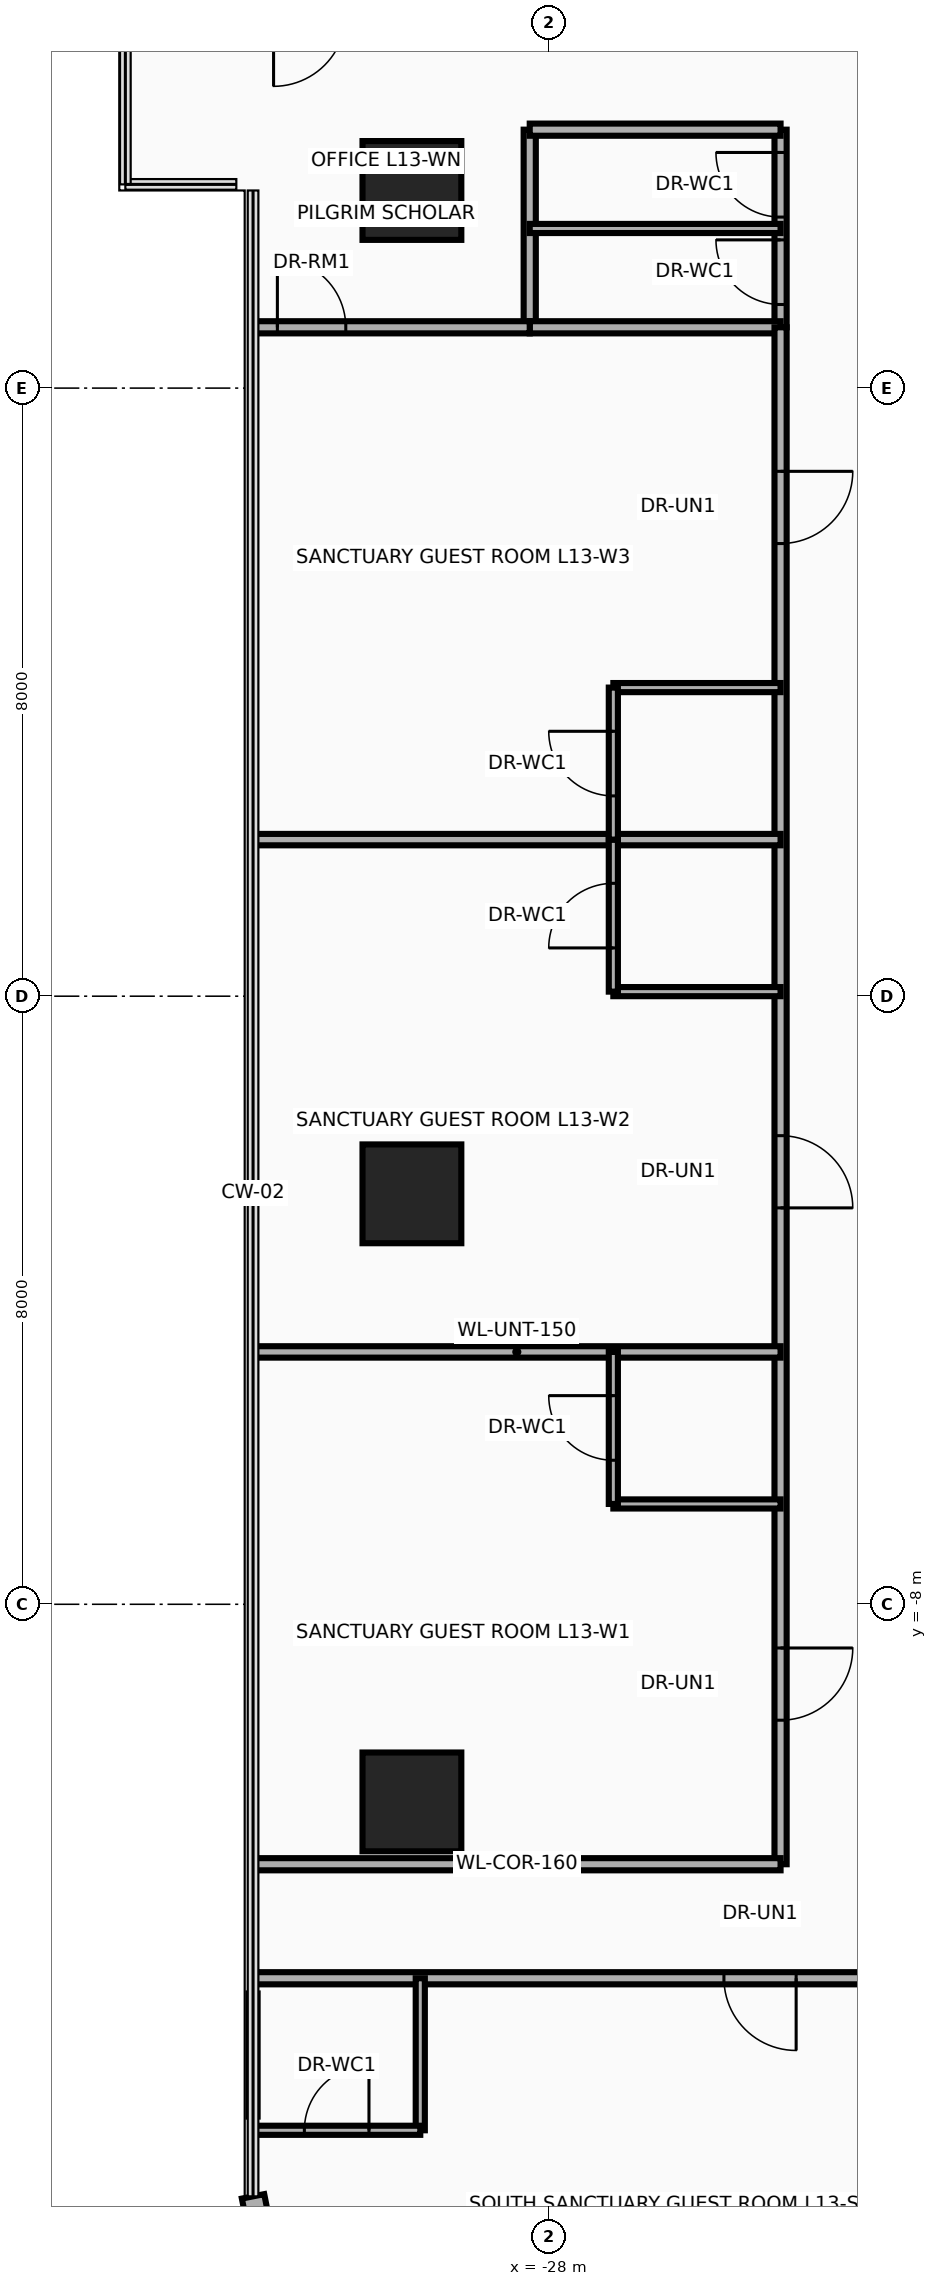
"""IFC4 building model, lengths in metres.
Left out: names, types, materials, properties, quantities, classifications, styles, units other than length and angle.
Written with IfcOpenShell. Run it as: python <this file> out.ifc"""

import sys

from ifc_helpers import new_model, si_unit, direction, frame, frame_2d, origin, origin_2d, place, context, subcontext, project, spatial, rectangle, circle, extrude, source, transform, mapped, element, fill, save


model = new_model("IFC4")
c1 = context("Model", 3, precision=1e-05, world=origin(), true_north=direction((0.0, 1.0)))
c2 = subcontext(c1, "Body", "Model", "MODEL_VIEW")
j1 = project(units=[si_unit("LENGTHUNIT", "METRE"), si_unit("PLANEANGLEUNIT", "RADIAN")], contexts=[c1])
p1 = place(None, origin())
s1 = spatial("IfcSite", under=j1, at=p1, CompositionType="ELEMENT")
p2 = place(p1, origin())
s2 = spatial("IfcBuilding", under=s1, at=p2, CompositionType="ELEMENT")
p3 = place(p2, frame((0.0, 0.0, 55.6)))
s3 = spatial("IfcBuildingStorey", under=s2, at=p3, CompositionType="ELEMENT", Elevation=55.6)
m1 = source(origin(), c2, "Body", "SweptSolid", [
    extrude(circle(Radius=0.65, at=origin_2d()), origin(), (0.0, 0.0, 1.0), 3.7),
])
for number, where, z_axis, x_axis in (
    (1, (-29.8, -10.6, 0.0), (0.0, 0.0, 1.0), (1.0, 0.0, 0.0)),
    (2, (-29.8, -2.6, 0.0), (0.0, 0.0, 1.0), (1.0, 0.0, 0.0)),
    (3, (-29.8, 10.6, 0.0), (0.0, 0.0, 1.0), (1.0, 0.0, 0.0)),
):
    element("IfcColumn", number, at=place(p3, frame(where, z_axis=z_axis, x_axis=x_axis)), inside=s3, PredefinedType="COLUMN", context=c2, shape_type="MappedRepresentation", body=[
        mapped(m1, transform((0.0, 0.0, 0.0), x_axis=(1.0, 0.0, 0.0), y_axis=(0.0, 1.0, 0.0), z_axis=(0.0, 0.0, 1.0), scale=1.0)),
    ])
p4 = place(p3, frame((-31.653, -16.982, 0.0), z_axis=(0.0, 0.0, 1.0), x_axis=(-0.194996050505, 0.980804027463, 0.0)))
e4 = element("IfcWall", 4, at=p4, inside=s3, PredefinedType="SOLIDWALL", context=c2, shape_type="SweptSolid", body=[
    extrude(rectangle(XDim=1.216, YDim=0.3, at=frame_2d((0.608, 0.0))), origin(), (0.0, 0.0, 1.0), 3.46),
])
p5 = place(p3, frame((-28.25, 8.8, 0.0), z_axis=(0.0, 0.0, 1.0), x_axis=(0.0, 1.0, 0.0)))
e5 = element("IfcWall", 5, at=p5, inside=s3, PredefinedType="PARTITIONING", context=c2, shape_type="SweptSolid", body=[
    extrude(rectangle(XDim=2.6, YDim=0.16, at=frame_2d((1.3, 0.0))), origin(), (0.0, 0.0, 1.0), 2.583),
])
p6 = place(p3, frame((-24.95, 8.8, 0.0), z_axis=(0.0, 0.0, 1.0), x_axis=(0.0, 1.0, 0.0)))
e6 = element("IfcWall", 6, at=p6, inside=s3, PredefinedType="PARTITIONING", context=c2, shape_type="SweptSolid", body=[
    extrude(rectangle(XDim=2.6, YDim=0.16, at=frame_2d((1.3, 0.0))), origin(), (0.0, 0.0, 1.0), 2.583),
])
p7 = place(p6, frame((0.3, 0.0, 0.0)))
e7 = element("IfcOpeningElement", 7, at=p7, cuts=e6, PredefinedType="OPENING", context=c2, shape_type="SweptSolid", body=[
    extrude(rectangle(XDim=0.85, YDim=2.1, at=frame_2d((0.425, 1.05))), frame((0.0, 0.095, 0.0), z_axis=(0.0, -1.0, 0.0), x_axis=(1.0, 0.0, 0.0)), (0.0, 0.0, 1.0), 0.19),
])
p8 = place(p6, frame((1.45, 0.0, 0.0)))
e8 = element("IfcOpeningElement", 8, at=p8, cuts=e6, PredefinedType="OPENING", context=c2, shape_type="SweptSolid", body=[
    extrude(rectangle(XDim=0.85, YDim=2.1, at=frame_2d((0.425, 1.05))), frame((0.0, 0.095, 0.0), z_axis=(0.0, -1.0, 0.0), x_axis=(1.0, 0.0, 0.0)), (0.0, 0.0, 1.0), 0.19),
])
for number, where, z_axis, x_axis in (
    (9, (-28.25, 8.8, 0.0), (0.0, 0.0, 1.0), (1.0, 0.0, 0.0)),
    (10, (-28.25, 11.4, 0.0), (0.0, 0.0, 1.0), (1.0, 0.0, 0.0)),
):
    element("IfcWall", number, at=place(p3, frame(where, z_axis=z_axis, x_axis=x_axis)), inside=s3, PredefinedType="PARTITIONING", context=c2, shape_type="SweptSolid", body=[
        extrude(rectangle(XDim=3.3, YDim=0.16, at=frame_2d((1.65, 0.0))), origin(), (0.0, 0.0, 1.0), 3.46),
    ])
p9 = place(p3, frame((-28.25, 10.1, 0.0), z_axis=(0.0, 0.0, 1.0), x_axis=(1.0, 0.0, 0.0)))
e11 = element("IfcWall", 11, at=p9, inside=s3, PredefinedType="PARTITIONING", context=c2, shape_type="SweptSolid", body=[
    extrude(rectangle(XDim=3.3, YDim=0.12, at=frame_2d((1.65, 0.0))), origin(), (0.0, 0.0, 1.0), 3.46),
])
p10 = place(p3, frame((-24.95, -11.42, 0.0), z_axis=(0.0, 0.0, 1.0), x_axis=(0.0, 1.0, 0.0)))
e12 = element("IfcWall", 12, at=p10, inside=s3, PredefinedType="PARTITIONING", context=c2, shape_type="SweptSolid", body=[
    extrude(rectangle(XDim=20.22, YDim=0.16, at=frame_2d((10.11, 0.0))), origin(), (0.0, 0.0, 1.0), 2.583),
])
p11 = place(p10, frame((1.895, 0.0, 0.0)))
e13 = element("IfcOpeningElement", 13, at=p11, cuts=e12, PredefinedType="OPENING", context=c2, shape_type="SweptSolid", body=[
    extrude(rectangle(XDim=0.95, YDim=2.15, at=frame_2d((0.475, 1.075))), frame((0.0, 0.095, 0.0), z_axis=(0.0, -1.0, 0.0), x_axis=(1.0, 0.0, 0.0)), (0.0, 0.0, 1.0), 0.19),
])
p12 = place(p10, frame((8.635, 0.0, 0.0)))
e14 = element("IfcOpeningElement", 14, at=p12, cuts=e12, PredefinedType="OPENING", context=c2, shape_type="SweptSolid", body=[
    extrude(rectangle(XDim=0.95, YDim=2.15, at=frame_2d((0.475, 1.075))), frame((0.0, 0.095, 0.0), z_axis=(0.0, -1.0, 0.0), x_axis=(1.0, 0.0, 0.0)), (0.0, 0.0, 1.0), 0.19),
])
p13 = place(p10, frame((17.375, 0.0, 0.0)))
e15 = element("IfcOpeningElement", 15, at=p13, cuts=e12, PredefinedType="OPENING", context=c2, shape_type="SweptSolid", body=[
    extrude(rectangle(XDim=0.95, YDim=2.15, at=frame_2d((0.475, 1.075))), frame((0.0, 0.095, 0.0), z_axis=(0.0, -1.0, 0.0), x_axis=(1.0, 0.0, 0.0)), (0.0, 0.0, 1.0), 0.19),
])
p14 = place(p3, frame((-31.89, 8.8, 0.0), z_axis=(0.0, 0.0, 1.0), x_axis=(1.0, 0.0, 0.0)))
e16 = element("IfcWall", 16, at=p14, inside=s3, PredefinedType="PARTITIONING", context=c2, shape_type="SweptSolid", body=[
    extrude(rectangle(XDim=3.64, YDim=0.16, at=frame_2d((1.82, 0.0))), origin(), (0.0, 0.0, 1.0), 2.896),
])
p15 = place(p14, frame((0.32, 0.0, 0.0)))
e17 = element("IfcOpeningElement", 17, at=p15, cuts=e16, PredefinedType="OPENING", context=c2, shape_type="SweptSolid", body=[
    extrude(rectangle(XDim=0.9, YDim=2.1, at=frame_2d((0.45, 1.05))), frame((0.0, 0.095, 0.0), z_axis=(0.0, -1.0, 0.0), x_axis=(1.0, 0.0, 0.0)), (0.0, 0.0, 1.0), 0.19),
])
for number, where, z_axis, x_axis in (
    (18, (-31.89, -4.68, 0.0), (0.0, 0.0, 1.0), (1.0, 0.0, 0.0)),
    (19, (-31.89, 2.06, 0.0), (0.0, 0.0, 1.0), (1.0, 0.0, 0.0)),
):
    element("IfcWall", number, at=place(p3, frame(where, z_axis=z_axis, x_axis=x_axis)), inside=s3, PredefinedType="PARTITIONING", context=c2, shape_type="SweptSolid", body=[
        extrude(rectangle(XDim=6.94, YDim=0.15, at=frame_2d((3.47, 0.0))), origin(), (0.0, 0.0, 1.0), 2.896),
    ])
p16 = place(p3, frame((-27.15, -6.68, 0.0), z_axis=(0.0, 0.0, 1.0), x_axis=(1.0, 0.0, 0.0)))
e20 = element("IfcWall", 20, at=p16, inside=s3, PredefinedType="PARTITIONING", context=c2, shape_type="SweptSolid", body=[
    extrude(rectangle(XDim=2.2, YDim=0.12, at=frame_2d((1.1, 0.0))), origin(), (0.0, 0.0, 1.0), 2.979),
])
p17 = place(p3, frame((-27.15, -6.68, 0.0), z_axis=(0.0, 0.0, 1.0), x_axis=(0.0, 1.0, 0.0)))
e21 = element("IfcWall", 21, at=p17, inside=s3, PredefinedType="PARTITIONING", context=c2, shape_type="SweptSolid", body=[
    extrude(rectangle(XDim=2.0, YDim=0.12, at=frame_2d((1.0, 0.0))), origin(), (0.0, 0.0, 1.0), 2.979),
])
p18 = place(p17, frame((0.575, 0.0, 0.0)))
e22 = element("IfcOpeningElement", 22, at=p18, cuts=e21, PredefinedType="OPENING", context=c2, shape_type="SweptSolid", body=[
    extrude(rectangle(XDim=0.85, YDim=2.1, at=frame_2d((0.425, 1.05))), frame((0.0, 0.075, 0.0), z_axis=(0.0, -1.0, 0.0), x_axis=(1.0, 0.0, 0.0)), (0.0, 0.0, 1.0), 0.15),
])
p19 = place(p3, frame((-27.15, 0.06, 0.0), z_axis=(0.0, 0.0, 1.0), x_axis=(1.0, 0.0, 0.0)))
e23 = element("IfcWall", 23, at=p19, inside=s3, PredefinedType="PARTITIONING", context=c2, shape_type="SweptSolid", body=[
    extrude(rectangle(XDim=2.2, YDim=0.12, at=frame_2d((1.1, 0.0))), origin(), (0.0, 0.0, 1.0), 2.979),
])
p20 = place(p3, frame((-27.15, 0.06, 0.0), z_axis=(0.0, 0.0, 1.0), x_axis=(0.0, 1.0, 0.0)))
e24 = element("IfcWall", 24, at=p20, inside=s3, PredefinedType="PARTITIONING", context=c2, shape_type="SweptSolid", body=[
    extrude(rectangle(XDim=2.0, YDim=0.12, at=frame_2d((1.0, 0.0))), origin(), (0.0, 0.0, 1.0), 2.979),
])
p21 = place(p20, frame((0.575, 0.0, 0.0)))
e25 = element("IfcOpeningElement", 25, at=p21, cuts=e24, PredefinedType="OPENING", context=c2, shape_type="SweptSolid", body=[
    extrude(rectangle(XDim=0.85, YDim=2.1, at=frame_2d((0.425, 1.05))), frame((0.0, 0.075, 0.0), z_axis=(0.0, -1.0, 0.0), x_axis=(1.0, 0.0, 0.0)), (0.0, 0.0, 1.0), 0.15),
])
p22 = place(p3, frame((-27.15, 4.06, 0.0), z_axis=(0.0, 0.0, 1.0), x_axis=(1.0, 0.0, 0.0)))
e26 = element("IfcWall", 26, at=p22, inside=s3, PredefinedType="PARTITIONING", context=c2, shape_type="SweptSolid", body=[
    extrude(rectangle(XDim=2.2, YDim=0.12, at=frame_2d((1.1, 0.0))), origin(), (0.0, 0.0, 1.0), 3.46),
])
p23 = place(p3, frame((-27.15, 2.06, 0.0), z_axis=(0.0, 0.0, 1.0), x_axis=(0.0, 1.0, 0.0)))
e27 = element("IfcWall", 27, at=p23, inside=s3, PredefinedType="PARTITIONING", context=c2, shape_type="SweptSolid", body=[
    extrude(rectangle(XDim=2.0, YDim=0.12, at=frame_2d((1.0, 0.0))), origin(), (0.0, 0.0, 1.0), 2.979),
])
p24 = place(p23, frame((0.575, 0.0, 0.0)))
e28 = element("IfcOpeningElement", 28, at=p24, cuts=e27, PredefinedType="OPENING", context=c2, shape_type="SweptSolid", body=[
    extrude(rectangle(XDim=0.85, YDim=2.1, at=frame_2d((0.425, 1.05))), frame((0.0, 0.075, 0.0), z_axis=(0.0, -1.0, 0.0), x_axis=(1.0, 0.0, 0.0)), (0.0, 0.0, 1.0), 0.15),
])
p25 = place(p3, frame((-31.89, -12.92, 0.0), z_axis=(0.0, 0.0, 1.0), x_axis=(1.0, 0.0, 0.0)))
e29 = element("IfcWall", 29, at=p25, inside=s3, PredefinedType="PARTITIONING", context=c2, shape_type="SweptSolid", body=[
    extrude(rectangle(XDim=22.28, YDim=0.16, at=frame_2d((11.14, 0.0))), origin(), (0.0, 0.0, 1.0), 2.834),
])
p26 = place(p25, frame((6.195, 0.0, 0.0)))
e30 = element("IfcOpeningElement", 30, at=p26, cuts=e29, PredefinedType="OPENING", context=c2, shape_type="SweptSolid", body=[
    extrude(rectangle(XDim=0.95, YDim=2.15, at=frame_2d((0.475, 1.075))), frame((0.0, 0.095, 0.0), z_axis=(0.0, -1.0, 0.0), x_axis=(1.0, 0.0, 0.0)), (0.0, 0.0, 1.0), 0.19),
])
p27 = place(p25, frame((17.335, 0.0, 0.0)))
e31 = element("IfcOpeningElement", 31, at=p27, cuts=e29, PredefinedType="OPENING", context=c2, shape_type="SweptSolid", body=[
    extrude(rectangle(XDim=0.95, YDim=2.15, at=frame_2d((0.475, 1.075))), frame((0.0, 0.095, 0.0), z_axis=(0.0, -1.0, 0.0), x_axis=(1.0, 0.0, 0.0)), (0.0, 0.0, 1.0), 0.19),
])
p28 = place(p3, frame((-29.69, -14.92, 0.0), z_axis=(0.0, 0.0, 1.0), x_axis=(0.0, 1.0, 0.0)))
e32 = element("IfcWall", 32, at=p28, inside=s3, PredefinedType="PARTITIONING", context=c2, shape_type="SweptSolid", body=[
    extrude(rectangle(XDim=2.0, YDim=0.12, at=frame_2d((1.0, 0.0))), origin(), (0.0, 0.0, 1.0), 3.46),
])
p29 = place(p3, frame((-31.89, -14.92, 0.0), z_axis=(0.0, 0.0, 1.0), x_axis=(1.0, 0.0, 0.0)))
e33 = element("IfcWall", 33, at=p29, inside=s3, PredefinedType="PARTITIONING", context=c2, shape_type="SweptSolid", body=[
    extrude(rectangle(XDim=2.2, YDim=0.12, at=frame_2d((1.1, 0.0))), origin(), (0.0, 0.0, 1.0), 3.46),
])
p30 = place(p29, frame((0.675, 0.0, 0.0)))
e34 = element("IfcOpeningElement", 34, at=p30, cuts=e33, PredefinedType="OPENING", context=c2, shape_type="SweptSolid", body=[
    extrude(rectangle(XDim=0.85, YDim=2.1, at=frame_2d((0.425, 1.05))), frame((0.0, 0.075, 0.0), z_axis=(0.0, -1.0, 0.0), x_axis=(1.0, 0.0, 0.0)), (0.0, 0.0, 1.0), 0.15),
])
p31 = place(p3, frame((-31.89, -14.74, 0.0), z_axis=(0.0, 0.0, 1.0), x_axis=(0.0, 1.0, 0.0)))
e35 = element("IfcWall", 35, at=p31, inside=s3, PredefinedType="PARTITIONING", context=c2, shape_type="SweptSolid", body=[
    extrude(rectangle(XDim=1.62, YDim=0.12, at=frame_2d((0.81, 0.0))), origin(), (0.0, 0.0, 1.0), 3.46),
])
p32 = place(p3, frame((-31.89, -11.42, 0.0), z_axis=(0.0, 0.0, 1.0), x_axis=(1.0, 0.0, 0.0)))
e36 = element("IfcWall", 36, at=p32, inside=s3, PredefinedType="PARTITIONING", context=c2, shape_type="SweptSolid", body=[
    extrude(rectangle(XDim=6.94, YDim=0.16, at=frame_2d((3.47, 0.0))), origin(), (0.0, 0.0, 1.0), 3.46),
])
p33 = place(p7, origin())
e37 = element("IfcDoor", 37, at=p33, inside=s3, OperationType="SINGLE_SWING_RIGHT", PredefinedType="DOOR", context=c2, shape_type="SweptSolid", body=[
    extrude(rectangle(XDim=0.85, YDim=2.1, at=frame_2d((0.425, 1.05))), frame((0.0, 0.025, 0.0), z_axis=(0.0, -1.0, 0.0), x_axis=(1.0, 0.0, 0.0)), (0.0, 0.0, 1.0), 0.05),
])
fill(e7, e37)
p34 = place(p8, origin())
e38 = element("IfcDoor", 38, at=p34, inside=s3, OperationType="SINGLE_SWING_LEFT", PredefinedType="DOOR", context=c2, shape_type="SweptSolid", body=[
    extrude(rectangle(XDim=0.85, YDim=2.1, at=frame_2d((0.425, 1.05))), frame((0.0, 0.025, 0.0), z_axis=(0.0, -1.0, 0.0), x_axis=(1.0, 0.0, 0.0)), (0.0, 0.0, 1.0), 0.05),
])
fill(e8, e38)
p35 = place(p15, origin())
e39 = element("IfcDoor", 39, at=p35, inside=s3, OperationType="SINGLE_SWING_RIGHT", PredefinedType="DOOR", context=c2, shape_type="SweptSolid", body=[
    extrude(rectangle(XDim=0.9, YDim=2.1, at=frame_2d((0.45, 1.05))), frame((0.0, 0.025, 0.0), z_axis=(0.0, -1.0, 0.0), x_axis=(1.0, 0.0, 0.0)), (0.0, 0.0, 1.0), 0.05),
])
fill(e17, e39)
p36 = place(p11, frame((0.95, 0.0, 0.0), z_axis=(0.0, 0.0, 1.0), x_axis=(-1.0, 0.0, 0.0)))
e40 = element("IfcDoor", 40, at=p36, inside=s3, OperationType="SINGLE_SWING_LEFT", PredefinedType="DOOR", context=c2, shape_type="SweptSolid", body=[
    extrude(rectangle(XDim=0.95, YDim=2.15, at=frame_2d((0.475, 1.075))), frame((0.0, 0.025, 0.0), z_axis=(0.0, -1.0, 0.0), x_axis=(1.0, 0.0, 0.0)), (0.0, 0.0, 1.0), 0.05),
])
fill(e13, e40)
p37 = place(p18, origin())
e41 = element("IfcDoor", 41, at=p37, inside=s3, OperationType="SINGLE_SWING_RIGHT", PredefinedType="DOOR", context=c2, shape_type="SweptSolid", body=[
    extrude(rectangle(XDim=0.85, YDim=2.1, at=frame_2d((0.425, 1.05))), frame((0.0, 0.025, 0.0), z_axis=(0.0, -1.0, 0.0), x_axis=(1.0, 0.0, 0.0)), (0.0, 0.0, 1.0), 0.05),
])
fill(e22, e41)
p38 = place(p12, frame((0.95, 0.0, 0.0), z_axis=(0.0, 0.0, 1.0), x_axis=(-1.0, 0.0, 0.0)))
e42 = element("IfcDoor", 42, at=p38, inside=s3, OperationType="SINGLE_SWING_LEFT", PredefinedType="DOOR", context=c2, shape_type="SweptSolid", body=[
    extrude(rectangle(XDim=0.95, YDim=2.15, at=frame_2d((0.475, 1.075))), frame((0.0, 0.025, 0.0), z_axis=(0.0, -1.0, 0.0), x_axis=(1.0, 0.0, 0.0)), (0.0, 0.0, 1.0), 0.05),
])
fill(e14, e42)
p39 = place(p21, origin())
e43 = element("IfcDoor", 43, at=p39, inside=s3, OperationType="SINGLE_SWING_RIGHT", PredefinedType="DOOR", context=c2, shape_type="SweptSolid", body=[
    extrude(rectangle(XDim=0.85, YDim=2.1, at=frame_2d((0.425, 1.05))), frame((0.0, 0.025, 0.0), z_axis=(0.0, -1.0, 0.0), x_axis=(1.0, 0.0, 0.0)), (0.0, 0.0, 1.0), 0.05),
])
fill(e25, e43)
p40 = place(p13, frame((0.95, 0.0, 0.0), z_axis=(0.0, 0.0, 1.0), x_axis=(-1.0, 0.0, 0.0)))
e44 = element("IfcDoor", 44, at=p40, inside=s3, OperationType="SINGLE_SWING_LEFT", PredefinedType="DOOR", context=c2, shape_type="SweptSolid", body=[
    extrude(rectangle(XDim=0.95, YDim=2.15, at=frame_2d((0.475, 1.075))), frame((0.0, 0.025, 0.0), z_axis=(0.0, -1.0, 0.0), x_axis=(1.0, 0.0, 0.0)), (0.0, 0.0, 1.0), 0.05),
])
fill(e15, e44)
p41 = place(p24, origin())
e45 = element("IfcDoor", 45, at=p41, inside=s3, OperationType="SINGLE_SWING_RIGHT", PredefinedType="DOOR", context=c2, shape_type="SweptSolid", body=[
    extrude(rectangle(XDim=0.85, YDim=2.1, at=frame_2d((0.425, 1.05))), frame((0.0, 0.025, 0.0), z_axis=(0.0, -1.0, 0.0), x_axis=(1.0, 0.0, 0.0)), (0.0, 0.0, 1.0), 0.05),
])
fill(e28, e45)
p42 = place(p26, frame((0.95, 0.0, 0.0), z_axis=(0.0, 0.0, 1.0), x_axis=(-1.0, 0.0, 0.0)))
e46 = element("IfcDoor", 46, at=p42, inside=s3, OperationType="SINGLE_SWING_LEFT", PredefinedType="DOOR", context=c2, shape_type="SweptSolid", body=[
    extrude(rectangle(XDim=0.95, YDim=2.15, at=frame_2d((0.475, 1.075))), frame((0.0, 0.025, 0.0), z_axis=(0.0, -1.0, 0.0), x_axis=(1.0, 0.0, 0.0)), (0.0, 0.0, 1.0), 0.05),
])
fill(e30, e46)
p43 = place(p30, origin())
e47 = element("IfcDoor", 47, at=p43, inside=s3, OperationType="SINGLE_SWING_RIGHT", PredefinedType="DOOR", context=c2, shape_type="SweptSolid", body=[
    extrude(rectangle(XDim=0.85, YDim=2.1, at=frame_2d((0.425, 1.05))), frame((0.0, 0.025, 0.0), z_axis=(0.0, -1.0, 0.0), x_axis=(1.0, 0.0, 0.0)), (0.0, 0.0, 1.0), 0.05),
])
fill(e34, e47)
save(model, sys.argv[1])
